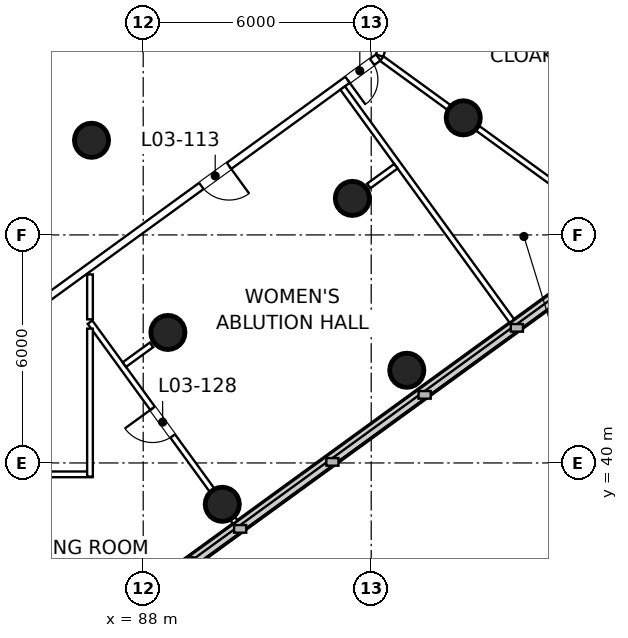
"""IFC4 building model, lengths in metres.
Left out: names, types, materials, properties, quantities, classifications, styles, units other than length and angle.
Written with IfcOpenShell. Run it as: python <this file> out.ifc"""

import sys

from ifc_helpers import new_model, si_unit, direction, frame, frame_2d, origin, origin_2d, place, context, subcontext, project, spatial, rectangle, circle, extrude, element, fill, save


model = new_model("IFC4")
c1 = context("Model", 3, precision=1e-05, world=origin(), true_north=direction((0.0, 1.0)))
c2 = subcontext(c1, "Body", "Model", "MODEL_VIEW")
j1 = project(units=[si_unit("LENGTHUNIT", "METRE"), si_unit("PLANEANGLEUNIT", "RADIAN")], contexts=[c1])
p1 = place(None, origin())
s1 = spatial("IfcSite", under=j1, at=p1, CompositionType="ELEMENT")
p2 = place(p1, origin())
s2 = spatial("IfcBuilding", under=s1, at=p2, CompositionType="ELEMENT")
p3 = place(p2, frame((0.0, 0.0, 23.0)))
s3 = spatial("IfcBuildingStorey", under=s2, at=p3, CompositionType="ELEMENT", Elevation=23.0)
for number, where, z_axis, x_axis in (
    (1, (86.64, 48.49, 0.0), (0.0, 0.0, 1.0), (1.0, 0.0, 0.0)),
    (2, (90.081, 38.912, 0.0), (0.0, 0.0, 1.0), (1.0, 0.0, 0.0)),
    (3, (94.936, 42.439, 0.0), (0.0, 0.0, 1.0), (1.0, 0.0, 0.0)),
    (4, (88.65, 43.434, 0.0), (0.0, 0.0, 1.0), (1.0, 0.0, 0.0)),
    (5, (93.504, 46.961, 0.0), (0.0, 0.0, 1.0), (1.0, 0.0, 0.0)),
    (6, (96.422, 49.081, 0.0), (0.0, 0.0, 1.0), (1.0, 0.0, 0.0)),
):
    element("IfcColumn", number, at=place(p3, frame(where, z_axis=z_axis, x_axis=x_axis)), inside=s3, PredefinedType="COLUMN", context=c2, shape_type="SweptSolid", body=[
        extrude(circle(Radius=0.45, at=origin_2d()), origin(), (0.0, 0.0, 1.0), 6.0),
    ])
p4 = place(p3, frame((78.381, 29.497, 0.0), z_axis=(0.0, 0.0, 1.0), x_axis=(0.809019086344, 0.587782372933, 0.0)))
e7 = element("IfcWall", 7, at=p4, inside=s3, PredefinedType="SOLIDWALL", context=c2, shape_type="SweptSolid", body=[
    extrude(rectangle(XDim=27.0, YDim=0.32, at=frame_2d((13.5, 0.0))), origin(), (0.0, 0.0, 1.0), 1.0),
])
p5 = place(p3, frame((97.401, 60.508, 0.0), z_axis=(0.0, 0.0, 1.0), x_axis=(-0.309010449617, -0.951058642791, 0.0)))
e8 = element("IfcWall", 8, at=p5, inside=s3, PredefinedType="PARTITIONING", context=c2, shape_type="SweptSolid", body=[
    extrude(rectangle(XDim=10.293, YDim=0.2, at=frame_2d((5.146, 0.0))), origin(), (0.0, 0.0, 1.0), 5.65),
])
p6 = place(p5, frame((7.286, 0.0, 0.0)))
e9 = element("IfcOpeningElement", 9, at=p6, cuts=e8, PredefinedType="OPENING", context=c2, shape_type="SweptSolid", body=[
    extrude(rectangle(XDim=0.9, YDim=2.1, at=frame_2d((0.45, 1.05))), frame((0.0, 0.11, 0.0), z_axis=(0.0, -1.0, 0.0), x_axis=(1.0, 0.0, 0.0)), (0.0, 0.0, 1.0), 0.22),
])
p7 = place(p5, frame((2.107, 0.0, 0.0)))
e10 = element("IfcOpeningElement", 10, at=p7, cuts=e8, PredefinedType="OPENING", context=c2, shape_type="SweptSolid", body=[
    extrude(rectangle(XDim=0.9, YDim=2.1, at=frame_2d((0.45, 1.05))), frame((0.0, 0.11, 0.0), z_axis=(0.0, -1.0, 0.0), x_axis=(1.0, 0.0, 0.0)), (0.0, 0.0, 1.0), 0.22),
])
p8 = place(p3, frame((94.184, 50.669, 0.0), z_axis=(0.0, 0.0, 1.0), x_axis=(-0.809025571226, -0.587773447089, 0.0)))
e11 = element("IfcWall", 11, at=p8, inside=s3, PredefinedType="PARTITIONING", context=c2, shape_type="SweptSolid", body=[
    extrude(rectangle(XDim=11.156, YDim=0.2, at=frame_2d((5.578, 0.0))), origin(), (0.0, 0.0, 1.0), 5.65),
])
p9 = place(p8, frame((4.852, 0.0, 0.0)))
e12 = element("IfcOpeningElement", 12, at=p9, cuts=e11, PredefinedType="OPENING", context=c2, shape_type="SweptSolid", body=[
    extrude(rectangle(XDim=0.9, YDim=2.1, at=frame_2d((0.45, 1.05))), frame((0.0, 0.11, 0.0), z_axis=(0.0, -1.0, 0.0), x_axis=(1.0, 0.0, 0.0)), (0.0, 0.0, 1.0), 0.22),
])
p10 = place(p8, frame((0.198, 0.0, 0.0)))
e13 = element("IfcOpeningElement", 13, at=p10, cuts=e11, PredefinedType="OPENING", context=c2, shape_type="SweptSolid", body=[
    extrude(rectangle(XDim=0.8, YDim=2.1, at=frame_2d((0.4, 1.05))), frame((0.0, 0.11, 0.0), z_axis=(0.0, -1.0, 0.0), x_axis=(1.0, 0.0, 0.0)), (0.0, 0.0, 1.0), 0.22),
])
p11 = place(p3, frame((100.743, 45.942, 0.0), z_axis=(0.0, 0.0, 1.0), x_axis=(-0.80901214883, 0.587791921556, 0.0)))
e14 = element("IfcWall", 14, at=p11, inside=s3, PredefinedType="PARTITIONING", context=c2, shape_type="SweptSolid", body=[
    extrude(rectangle(XDim=7.99, YDim=0.15, at=frame_2d((3.995, 0.0))), origin(), (0.0, 0.0, 1.0), 5.65),
])
p12 = place(p3, frame((85.568, 34.916, 0.0), z_axis=(0.0, 0.0, 1.0), x_axis=(-0.587761624616, 0.80903416036, 0.0)))
e15 = element("IfcWall", 15, at=p12, inside=s3, PredefinedType="PARTITIONING", context=c2, shape_type="SweptSolid", body=[
    extrude(rectangle(XDim=5.913, YDim=0.15, at=frame_2d((2.957, 0.0))), origin(), (0.0, 0.0, 1.0), 4.95),
])
p13 = place(p3, frame((90.422, 38.443, 0.0), z_axis=(0.0, 0.0, 1.0), x_axis=(-0.587778742149, 0.809021724231, 0.0)))
e16 = element("IfcWall", 16, at=p13, inside=s3, PredefinedType="PARTITIONING", context=c2, shape_type="SweptSolid", body=[
    extrude(rectangle(XDim=6.503, YDim=0.15, at=frame_2d((3.251, 0.0))), origin(), (0.0, 0.0, 1.0), 4.95),
])
p14 = place(p13, frame((2.802, 0.0, 0.0)))
e17 = element("IfcOpeningElement", 17, at=p14, cuts=e16, PredefinedType="OPENING", context=c2, shape_type="SweptSolid", body=[
    extrude(rectangle(XDim=0.9, YDim=2.1, at=frame_2d((0.45, 1.05))), frame((0.0, 0.085, 0.0), z_axis=(0.0, -1.0, 0.0), x_axis=(1.0, 0.0, 0.0)), (0.0, 0.0, 1.0), 0.17),
])
p15 = place(p3, frame((97.704, 43.733, 0.0), z_axis=(0.0, 0.0, 1.0), x_axis=(-0.587800109381, 0.80900619986, 0.0)))
e18 = element("IfcWall", 18, at=p15, inside=s3, PredefinedType="PARTITIONING", context=c2, shape_type="SweptSolid", body=[
    extrude(rectangle(XDim=7.58, YDim=0.15, at=frame_2d((3.79, 0.0))), origin(), (0.0, 0.0, 1.0), 4.95),
])
p16 = place(p3, frame((88.22, 43.107, 0.0), z_axis=(0.0, 0.0, 1.0), x_axis=(-0.809141502874, -0.587613842865, 0.0)))
e19 = element("IfcWall", 19, at=p16, inside=s3, PredefinedType="PARTITIONING", context=c2, shape_type="SweptSolid", body=[
    extrude(rectangle(XDim=0.885, YDim=0.15, at=frame_2d((0.442, 0.0))), origin(), (0.0, 0.0, 1.0), 4.95),
])
p17 = place(p3, frame((93.934, 47.288, 0.0), z_axis=(0.0, 0.0, 1.0), x_axis=(0.809105603792, 0.587663272557, 0.0)))
e20 = element("IfcWall", 20, at=p17, inside=s3, PredefinedType="PARTITIONING", context=c2, shape_type="SweptSolid", body=[
    extrude(rectangle(XDim=0.885, YDim=0.15, at=frame_2d((0.443, 0.0))), origin(), (0.0, 0.0, 1.0), 4.95),
])
p18 = place(p3, frame((86.6, 43.778, 0.0), z_axis=(0.0, 0.0, 1.0), x_axis=(0.0, 1.0, 0.0)))
e21 = element("IfcWall", 21, at=p18, inside=s3, PredefinedType="PARTITIONING", context=c2, shape_type="SweptSolid", body=[
    extrude(rectangle(XDim=1.183, YDim=0.15, at=frame_2d((0.591, 0.0))), origin(), (0.0, 0.0, 1.0), 5.65),
])
p19 = place(p3, frame((82.199, 39.7, 0.0), z_axis=(0.0, 0.0, 1.0), x_axis=(1.0, 0.0, 0.0)))
e22 = element("IfcWall", 22, at=p19, inside=s3, PredefinedType="PARTITIONING", context=c2, shape_type="SweptSolid", body=[
    extrude(rectangle(XDim=4.46, YDim=0.15, at=frame_2d((2.23, 0.0))), origin(), (0.0, 0.0, 1.0), 4.95),
])
p20 = place(p3, frame((86.6, 39.64, 0.0), z_axis=(0.0, 0.0, 1.0), x_axis=(0.0, 1.0, 0.0)))
e23 = element("IfcWall", 23, at=p20, inside=s3, PredefinedType="PARTITIONING", context=c2, shape_type="SweptSolid", body=[
    extrude(rectangle(XDim=3.894, YDim=0.15, at=frame_2d((1.947, 0.0))), origin(), (0.0, 0.0, 1.0), 4.95),
])
p21 = place(p9, origin())
e24 = element("IfcDoor", 24, at=p21, inside=s3, OperationType="SINGLE_SWING_LEFT", PredefinedType="DOOR", context=c2, shape_type="SweptSolid", body=[
    extrude(rectangle(XDim=0.9, YDim=2.1, at=frame_2d((0.45, 1.05))), frame((0.0, 0.025, 0.0), z_axis=(0.0, -1.0, 0.0), x_axis=(1.0, 0.0, 0.0)), (0.0, 0.0, 1.0), 0.05),
])
fill(e12, e24)
p22 = place(p10, origin())
e25 = element("IfcDoor", 25, at=p22, inside=s3, OperationType="SINGLE_SWING_RIGHT", PredefinedType="DOOR", context=c2, shape_type="SweptSolid", body=[
    extrude(rectangle(XDim=0.8, YDim=2.1, at=frame_2d((0.4, 1.05))), frame((0.0, 0.025, 0.0), z_axis=(0.0, -1.0, 0.0), x_axis=(1.0, 0.0, 0.0)), (0.0, 0.0, 1.0), 0.05),
])
fill(e13, e25)
p23 = place(p14, origin())
e26 = element("IfcDoor", 26, at=p23, inside=s3, OperationType="SINGLE_SWING_RIGHT", PredefinedType="DOOR", context=c2, shape_type="SweptSolid", body=[
    extrude(rectangle(XDim=0.9, YDim=2.1, at=frame_2d((0.45, 1.05))), frame((0.0, 0.025, 0.0), z_axis=(0.0, -1.0, 0.0), x_axis=(1.0, 0.0, 0.0)), (0.0, 0.0, 1.0), 0.05),
])
fill(e17, e26)
save(model, sys.argv[1])
